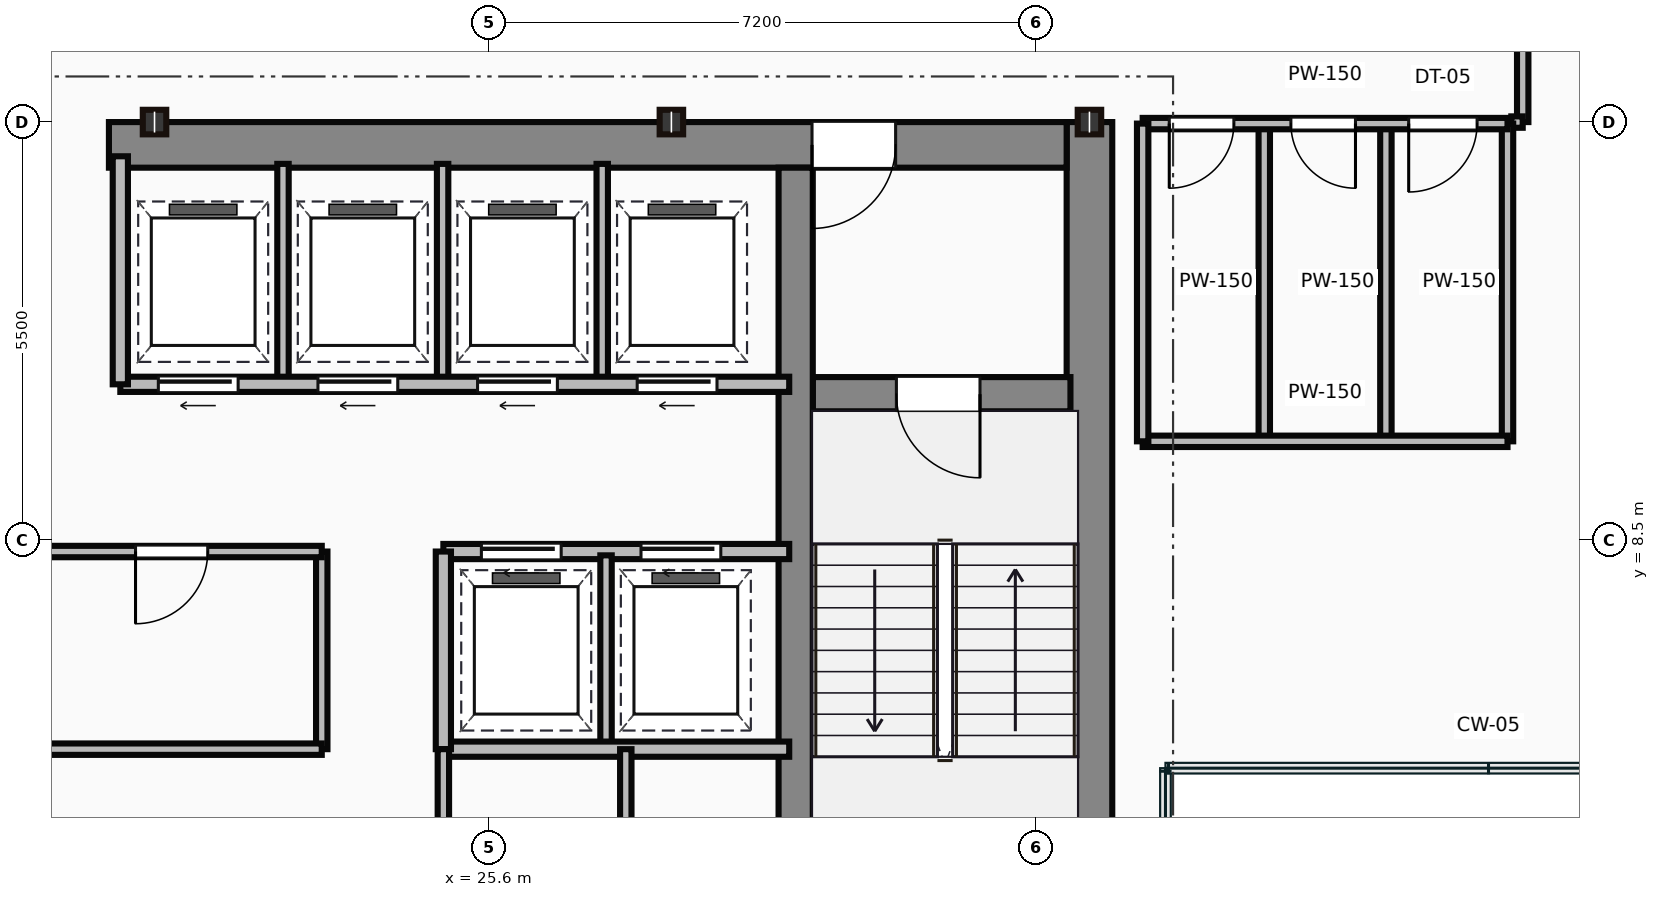
"""IFC4 building model, lengths in metres.
Left out: names, types, materials, properties, quantities, classifications, styles, units other than length and angle.
Written with IfcOpenShell. Run it as: python <this file> out.ifc"""

import sys

from ifc_helpers import new_model, si_unit, direction, frame, frame_2d, origin, origin_2d, place, context, subcontext, project, spatial, rectangle, i_section, extrude, source, transform, mapped, element, fill, save


model = new_model("IFC4")
c1 = context("Model", 3, precision=1e-05, world=origin(), true_north=direction((0.0, 1.0)))
c2 = subcontext(c1, "Body", "Model", "MODEL_VIEW")
j1 = project(units=[si_unit("LENGTHUNIT", "METRE"), si_unit("PLANEANGLEUNIT", "RADIAN")], contexts=[c1])
p1 = place(None, origin())
s1 = spatial("IfcSite", under=j1, at=p1, CompositionType="ELEMENT")
p2 = place(p1, origin())
s2 = spatial("IfcBuilding", under=s1, at=p2, CompositionType="ELEMENT")
p3 = place(p2, frame((0.0, 0.0, 192.25)))
s3 = spatial("IfcBuildingStorey", under=s2, at=p3, CompositionType="ELEMENT", Elevation=192.25)
m1 = source(origin(), c2, "Body", "SweptSolid", [
    extrude(rectangle(XDim=13.1, YDim=0.6, at=frame_2d((6.55, 0.0))), origin(), (0.0, 0.0, 1.0), 3.65),
])
p4 = place(p3, frame((33.5, 0.9, 0.0), z_axis=(0.0, 0.0, 1.0), x_axis=(0.0, 1.0, 0.0)))
e1 = element("IfcWall", 1, at=p4, inside=s3, PredefinedType="SHEAR", context=c2, shape_type="MappedRepresentation", body=[
    mapped(m1, transform((0.0, 0.0, 0.0))),
])
m2 = source(origin(), c2, "Body", "SweptSolid", [
    extrude(rectangle(XDim=12.6, YDim=0.6, at=frame_2d((6.3, 0.0))), origin(), (0.0, 0.0, 1.0), 3.65),
])
p5 = place(p3, frame((20.6, 13.7, 0.0), z_axis=(0.0, 0.0, 1.0), x_axis=(1.0, 0.0, 0.0)))
e2 = element("IfcWall", 2, at=p5, inside=s3, PredefinedType="SHEAR", context=c2, shape_type="MappedRepresentation", body=[
    mapped(m2, transform((0.0, 0.0, 0.0))),
])
p6 = place(p5, frame((9.25, 0.0, 0.0)))
e3 = element("IfcOpeningElement", 3, at=p6, cuts=e2, PredefinedType="OPENING", context=c2, shape_type="SweptSolid", body=[
    extrude(rectangle(XDim=1.1, YDim=2.15, at=frame_2d((0.55, 1.075))), frame((0.0, 0.31, 0.0), z_axis=(0.0, -1.0, 0.0), x_axis=(1.0, 0.0, 0.0)), (0.0, 0.0, 1.0), 0.62),
])
m3 = source(origin(), c2, "Body", "SweptSolid", [
    extrude(rectangle(XDim=12.5, YDim=0.45, at=frame_2d((6.25, 0.0))), origin(), (0.0, 0.0, 1.0), 3.65),
])
p7 = place(p3, frame((29.635, 0.9, 0.0), z_axis=(0.0, 0.0, 1.0), x_axis=(0.0, 1.0, 0.0)))
e4 = element("IfcWall", 4, at=p7, inside=s3, PredefinedType="SHEAR", context=c2, shape_type="MappedRepresentation", body=[
    mapped(m3, transform((0.0, 0.0, 0.0))),
])
m4 = source(origin(), c2, "Body", "SweptSolid", [
    extrude(rectangle(XDim=3.39, YDim=0.45, at=frame_2d((1.695, 0.0))), origin(), (0.0, 0.0, 1.0), 3.65),
])
p8 = place(p3, frame((29.86, 10.42, 0.0), z_axis=(0.0, 0.0, 1.0), x_axis=(1.0, 0.0, 0.0)))
e5 = element("IfcWall", 5, at=p8, inside=s3, PredefinedType="SHEAR", context=c2, shape_type="MappedRepresentation", body=[
    mapped(m4, transform((0.0, 0.0, 0.0))),
])
p9 = place(p8, frame((1.1, 0.0, 0.0)))
e6 = element("IfcOpeningElement", 6, at=p9, cuts=e5, PredefinedType="OPENING", context=c2, shape_type="SweptSolid", body=[
    extrude(rectangle(XDim=1.1, YDim=2.15, at=frame_2d((0.55, 1.075))), frame((0.0, 0.235, 0.0), z_axis=(0.0, -1.0, 0.0), x_axis=(1.0, 0.0, 0.0)), (0.0, 0.0, 1.0), 0.47),
])
m5 = source(origin(), c2, "Body", "SweptSolid", [
    extrude(i_section(OverallWidth=0.309, OverallDepth=0.323, WebThickness=0.014, FlangeThickness=0.023, at=origin_2d()), origin(), (0.0, 0.0, 1.0), 3.65),
])
for number, where, z_axis, x_axis in (
    (7, (21.2, 14.0, 0.0), (0.0, 0.0, 1.0), (1.0, 0.0, 0.0)),
    (8, (28.0, 14.0, 0.0), (0.0, 0.0, 1.0), (1.0, 0.0, 0.0)),
    (9, (33.5, 14.0, 0.0), (0.0, 0.0, 1.0), (1.0, 0.0, 0.0)),
):
    element("IfcColumn", number, at=place(p3, frame(where, z_axis=z_axis, x_axis=x_axis)), inside=s3, PredefinedType="COLUMN", context=c2, shape_type="MappedRepresentation", body=[
        mapped(m5, transform((0.0, 0.0, 0.0))),
    ])
m6 = source(origin(), c2, "Body", "SweptSolid", [
    extrude(rectangle(XDim=11.85, YDim=0.15, at=frame_2d((5.925, 0.0))), origin(), (0.0, 0.0, 1.0), 3.4),
])
p10 = place(p3, frame((11.55, 5.75, 0.0), z_axis=(0.0, 0.0, 1.0), x_axis=(1.0, 0.0, 0.0)))
e10 = element("IfcWall", 10, at=p10, inside=s3, PredefinedType="PARTITIONING", context=c2, shape_type="MappedRepresentation", body=[
    mapped(m6, transform((0.0, 0.0, 0.0))),
])
p11 = place(p3, frame((11.55, 8.35, 0.0), z_axis=(0.0, 0.0, 1.0), x_axis=(1.0, 0.0, 0.0)))
e11 = element("IfcWall", 11, at=p11, inside=s3, PredefinedType="PARTITIONING", context=c2, shape_type="MappedRepresentation", body=[
    mapped(m6, transform((0.0, 0.0, 0.0))),
])
p12 = place(p11, frame((1.1, 0.0, 0.0)))
e12 = element("IfcOpeningElement", 12, at=p12, cuts=e11, PredefinedType="OPENING", context=c2, shape_type="SweptSolid", body=[
    extrude(rectangle(XDim=0.95, YDim=2.15, at=frame_2d((0.475, 1.075))), frame((0.0, 0.085, 0.0), z_axis=(0.0, -1.0, 0.0), x_axis=(1.0, 0.0, 0.0)), (0.0, 0.0, 1.0), 0.17),
])
p13 = place(p11, frame((9.4, 0.0, 0.0)))
e13 = element("IfcOpeningElement", 13, at=p13, cuts=e11, PredefinedType="OPENING", context=c2, shape_type="SweptSolid", body=[
    extrude(rectangle(XDim=0.95, YDim=2.15, at=frame_2d((0.475, 1.075))), frame((0.0, 0.085, 0.0), z_axis=(0.0, -1.0, 0.0), x_axis=(1.0, 0.0, 0.0)), (0.0, 0.0, 1.0), 0.17),
])
m7 = source(origin(), c2, "Body", "SweptSolid", [
    extrude(rectangle(XDim=2.6, YDim=0.15, at=frame_2d((1.3, 0.0))), origin(), (0.0, 0.0, 1.0), 3.4),
])
p14 = place(p3, frame((23.4, 5.75, 0.0), z_axis=(0.0, 0.0, 1.0), x_axis=(0.0, 1.0, 0.0)))
e14 = element("IfcWall", 14, at=p14, inside=s3, PredefinedType="PARTITIONING", context=c2, shape_type="MappedRepresentation", body=[
    mapped(m7, transform((0.0, 0.0, 0.0))),
])
m8 = source(origin(), c2, "Body", "SweptSolid", [
    extrude(rectangle(XDim=8.8, YDim=0.2, at=frame_2d((4.4, 0.0))), origin(), (0.0, 0.0, 1.0), 3.4),
])
p15 = place(p3, frame((20.75, 10.55, 0.0), z_axis=(0.0, 0.0, 1.0), x_axis=(1.0, 0.0, 0.0)))
e15 = element("IfcWall", 15, at=p15, inside=s3, PredefinedType="PARTITIONING", context=c2, shape_type="MappedRepresentation", body=[
    mapped(m8, transform((0.0, 0.0, 0.0))),
])
p16 = place(p15, frame((0.5, 0.0, 0.0)))
e16 = element("IfcOpeningElement", 16, at=p16, cuts=e15, PredefinedType="OPENING", context=c2, shape_type="SweptSolid", body=[
    extrude(rectangle(XDim=1.05, YDim=2.15, at=frame_2d((0.525, 1.075))), frame((0.0, 0.11, 0.0), z_axis=(0.0, -1.0, 0.0), x_axis=(1.0, 0.0, 0.0)), (0.0, 0.0, 1.0), 0.22),
])
p17 = place(p15, frame((2.6, 0.0, 0.0)))
e17 = element("IfcOpeningElement", 17, at=p17, cuts=e15, PredefinedType="OPENING", context=c2, shape_type="SweptSolid", body=[
    extrude(rectangle(XDim=1.05, YDim=2.15, at=frame_2d((0.525, 1.075))), frame((0.0, 0.11, 0.0), z_axis=(0.0, -1.0, 0.0), x_axis=(1.0, 0.0, 0.0)), (0.0, 0.0, 1.0), 0.22),
])
p18 = place(p15, frame((4.7, 0.0, 0.0)))
e18 = element("IfcOpeningElement", 18, at=p18, cuts=e15, PredefinedType="OPENING", context=c2, shape_type="SweptSolid", body=[
    extrude(rectangle(XDim=1.05, YDim=2.15, at=frame_2d((0.525, 1.075))), frame((0.0, 0.11, 0.0), z_axis=(0.0, -1.0, 0.0), x_axis=(1.0, 0.0, 0.0)), (0.0, 0.0, 1.0), 0.22),
])
p19 = place(p15, frame((6.8, 0.0, 0.0)))
e19 = element("IfcOpeningElement", 19, at=p19, cuts=e15, PredefinedType="OPENING", context=c2, shape_type="SweptSolid", body=[
    extrude(rectangle(XDim=1.05, YDim=2.15, at=frame_2d((0.525, 1.075))), frame((0.0, 0.11, 0.0), z_axis=(0.0, -1.0, 0.0), x_axis=(1.0, 0.0, 0.0)), (0.0, 0.0, 1.0), 0.22),
])
m9 = source(origin(), c2, "Body", "SweptSolid", [
    extrude(rectangle(XDim=3.0, YDim=0.2, at=frame_2d((1.5, 0.0))), origin(), (0.0, 0.0, 1.0), 3.4),
])
p20 = place(p3, frame((20.75, 10.55, 0.0), z_axis=(0.0, 0.0, 1.0), x_axis=(0.0, 1.0, 0.0)))
e20 = element("IfcWall", 20, at=p20, inside=s3, PredefinedType="PARTITIONING", context=c2, shape_type="MappedRepresentation", body=[
    mapped(m9, transform((0.0, 0.0, 0.0))),
])
m10 = source(origin(), c2, "Body", "SweptSolid", [
    extrude(rectangle(XDim=2.85, YDim=0.15, at=frame_2d((1.425, 0.0))), origin(), (0.0, 0.0, 1.0), 3.4),
])
for number, where, z_axis, x_axis in (
    (21, (22.89, 10.6, 0.0), (0.0, 0.0, 1.0), (0.0, 1.0, 0.0)),
    (22, (24.99, 10.6, 0.0), (0.0, 0.0, 1.0), (0.0, 1.0, 0.0)),
    (23, (27.09, 10.6, 0.0), (0.0, 0.0, 1.0), (0.0, 1.0, 0.0)),
):
    element("IfcWall", number, at=place(p3, frame(where, z_axis=z_axis, x_axis=x_axis)), inside=s3, PredefinedType="PARTITIONING", context=c2, shape_type="MappedRepresentation", body=[
        mapped(m10, transform((0.0, 0.0, 0.0))),
    ])
m11 = source(origin(), c2, "Body", "SweptSolid", [
    extrude(rectangle(XDim=4.55, YDim=0.2, at=frame_2d((2.275, 0.0))), origin(), (0.0, 0.0, 1.0), 3.4),
])
p21 = place(p3, frame((25.0, 8.35, 0.0), z_axis=(0.0, 0.0, 1.0), x_axis=(1.0, 0.0, 0.0)))
e24 = element("IfcWall", 24, at=p21, inside=s3, PredefinedType="PARTITIONING", context=c2, shape_type="MappedRepresentation", body=[
    mapped(m11, transform((0.0, 0.0, 0.0))),
])
p22 = place(p21, frame((0.5, 0.0, 0.0)))
e25 = element("IfcOpeningElement", 25, at=p22, cuts=e24, PredefinedType="OPENING", context=c2, shape_type="SweptSolid", body=[
    extrude(rectangle(XDim=1.05, YDim=2.15, at=frame_2d((0.525, 1.075))), frame((0.0, 0.11, 0.0), z_axis=(0.0, -1.0, 0.0), x_axis=(1.0, 0.0, 0.0)), (0.0, 0.0, 1.0), 0.22),
])
p23 = place(p21, frame((2.6, 0.0, 0.0)))
e26 = element("IfcOpeningElement", 26, at=p23, cuts=e24, PredefinedType="OPENING", context=c2, shape_type="SweptSolid", body=[
    extrude(rectangle(XDim=1.05, YDim=2.15, at=frame_2d((0.525, 1.075))), frame((0.0, 0.11, 0.0), z_axis=(0.0, -1.0, 0.0), x_axis=(1.0, 0.0, 0.0)), (0.0, 0.0, 1.0), 0.22),
])
p24 = place(p3, frame((25.0, 5.75, 0.0), z_axis=(0.0, 0.0, 1.0), x_axis=(1.0, 0.0, 0.0)))
e27 = element("IfcWall", 27, at=p24, inside=s3, PredefinedType="PARTITIONING", context=c2, shape_type="MappedRepresentation", body=[
    mapped(m11, transform((0.0, 0.0, 0.0))),
])
m12 = source(origin(), c2, "Body", "SweptSolid", [
    extrude(rectangle(XDim=2.6, YDim=0.2, at=frame_2d((1.3, 0.0))), origin(), (0.0, 0.0, 1.0), 3.4),
])
p25 = place(p3, frame((25.0, 5.75, 0.0), z_axis=(0.0, 0.0, 1.0), x_axis=(0.0, 1.0, 0.0)))
e28 = element("IfcWall", 28, at=p25, inside=s3, PredefinedType="PARTITIONING", context=c2, shape_type="MappedRepresentation", body=[
    mapped(m12, transform((0.0, 0.0, 0.0))),
])
m13 = source(origin(), c2, "Body", "SweptSolid", [
    extrude(rectangle(XDim=2.5, YDim=0.15, at=frame_2d((1.25, 0.0))), origin(), (0.0, 0.0, 1.0), 3.4),
])
p26 = place(p3, frame((27.14, 5.8, 0.0), z_axis=(0.0, 0.0, 1.0), x_axis=(0.0, 1.0, 0.0)))
e29 = element("IfcWall", 29, at=p26, inside=s3, PredefinedType="PARTITIONING", context=c2, shape_type="MappedRepresentation", body=[
    mapped(m13, transform((0.0, 0.0, 0.0))),
])
m14 = source(origin(), c2, "Body", "SweptSolid", [
    extrude(rectangle(XDim=4.9, YDim=0.15, at=frame_2d((2.45, 0.0))), origin(), (0.0, 0.0, 1.0), 3.4),
])
p27 = place(p3, frame((25.0, 0.85, 0.0), z_axis=(0.0, 0.0, 1.0), x_axis=(0.0, 1.0, 0.0)))
e30 = element("IfcWall", 30, at=p27, inside=s3, PredefinedType="PARTITIONING", context=c2, shape_type="MappedRepresentation", body=[
    mapped(m14, transform((0.0, 0.0, 0.0))),
])
p28 = place(p27, frame((2.5, 0.0, 0.0)))
e31 = element("IfcOpeningElement", 31, at=p28, cuts=e30, PredefinedType="OPENING", context=c2, shape_type="SweptSolid", body=[
    extrude(rectangle(XDim=0.95, YDim=2.15, at=frame_2d((0.475, 1.075))), frame((0.0, 0.085, 0.0), z_axis=(0.0, -1.0, 0.0), x_axis=(1.0, 0.0, 0.0)), (0.0, 0.0, 1.0), 0.17),
])
m15 = source(origin(), c2, "Body", "SweptSolid", [
    extrude(rectangle(XDim=3.4, YDim=0.15, at=frame_2d((1.7, 0.0))), origin(), (0.0, 0.0, 1.0), 3.4),
])
p29 = place(p3, frame((27.4, 2.35, 0.0), z_axis=(0.0, 0.0, 1.0), x_axis=(0.0, 1.0, 0.0)))
e32 = element("IfcWall", 32, at=p29, inside=s3, PredefinedType="PARTITIONING", context=c2, shape_type="MappedRepresentation", body=[
    mapped(m15, transform((0.0, 0.0, 0.0))),
])
p30 = place(p29, frame((1.1, 0.0, 0.0)))
e33 = element("IfcOpeningElement", 33, at=p30, cuts=e32, PredefinedType="OPENING", context=c2, shape_type="SweptSolid", body=[
    extrude(rectangle(XDim=0.85, YDim=2.1, at=frame_2d((0.425, 1.05))), frame((0.0, 0.085, 0.0), z_axis=(0.0, -1.0, 0.0), x_axis=(1.0, 0.0, 0.0)), (0.0, 0.0, 1.0), 0.17),
])
m16 = source(origin(), c2, "Body", "SweptSolid", [
    extrude(rectangle(XDim=4.8, YDim=0.15, at=frame_2d((2.4, 0.0))), origin(), (0.0, 0.0, 1.0), 2.787),
])
p31 = place(p3, frame((34.2, 13.98, 0.0), z_axis=(0.0, 0.0, 1.0), x_axis=(1.0, 0.0, 0.0)))
e34 = element("IfcWall", 34, at=p31, inside=s3, PredefinedType="PARTITIONING", context=c2, shape_type="MappedRepresentation", body=[
    mapped(m16, transform((0.0, 0.0, 0.0))),
])
p32 = place(p31, frame((0.35, 0.0, 0.0)))
e35 = element("IfcOpeningElement", 35, at=p32, cuts=e34, PredefinedType="OPENING", context=c2, shape_type="SweptSolid", body=[
    extrude(rectangle(XDim=0.85, YDim=2.1, at=frame_2d((0.425, 1.05))), frame((0.0, 0.085, 0.0), z_axis=(0.0, -1.0, 0.0), x_axis=(1.0, 0.0, 0.0)), (0.0, 0.0, 1.0), 0.17),
])
p33 = place(p31, frame((1.95, 0.0, 0.0)))
e36 = element("IfcOpeningElement", 36, at=p33, cuts=e34, PredefinedType="OPENING", context=c2, shape_type="SweptSolid", body=[
    extrude(rectangle(XDim=0.85, YDim=2.1, at=frame_2d((0.425, 1.05))), frame((0.0, 0.085, 0.0), z_axis=(0.0, -1.0, 0.0), x_axis=(1.0, 0.0, 0.0)), (0.0, 0.0, 1.0), 0.17),
])
p34 = place(p31, frame((3.5, 0.0, 0.0)))
e37 = element("IfcOpeningElement", 37, at=p34, cuts=e34, PredefinedType="OPENING", context=c2, shape_type="SweptSolid", body=[
    extrude(rectangle(XDim=0.9, YDim=2.1, at=frame_2d((0.45, 1.05))), frame((0.0, 0.085, 0.0), z_axis=(0.0, -1.0, 0.0), x_axis=(1.0, 0.0, 0.0)), (0.0, 0.0, 1.0), 0.17),
])
m17 = source(origin(), c2, "Body", "SweptSolid", [
    extrude(rectangle(XDim=4.8, YDim=0.15, at=frame_2d((2.4, 0.0))), origin(), (0.0, 0.0, 1.0), 3.4),
])
p35 = place(p3, frame((34.2, 9.8, 0.0), z_axis=(0.0, 0.0, 1.0), x_axis=(1.0, 0.0, 0.0)))
e38 = element("IfcWall", 38, at=p35, inside=s3, PredefinedType="PARTITIONING", context=c2, shape_type="MappedRepresentation", body=[
    mapped(m17, transform((0.0, 0.0, 0.0))),
])
m18 = source(origin(), c2, "Body", "SweptSolid", [
    extrude(rectangle(XDim=4.18, YDim=0.15, at=frame_2d((2.09, 0.0))), origin(), (0.0, 0.0, 1.0), 3.4),
])
for number, where, z_axis, x_axis in (
    (39, (39.0, 9.8, 0.0), (0.0, 0.0, 1.0), (0.0, 1.0, 0.0)),
    (40, (34.2, 9.8, 0.0), (0.0, 0.0, 1.0), (0.0, 1.0, 0.0)),
    (41, (35.8, 9.8, 0.0), (0.0, 0.0, 1.0), (0.0, 1.0, 0.0)),
    (42, (37.4, 9.8, 0.0), (0.0, 0.0, 1.0), (0.0, 1.0, 0.0)),
):
    element("IfcWall", number, at=place(p3, frame(where, z_axis=z_axis, x_axis=x_axis)), inside=s3, PredefinedType="PARTITIONING", context=c2, shape_type="MappedRepresentation", body=[
        mapped(m18, transform((0.0, 0.0, 0.0))),
    ])
m19 = source(origin(), c2, "Body", "SweptSolid", [
    extrude(rectangle(XDim=2.2, YDim=0.15, at=frame_2d((1.1, 0.0))), origin(), (0.0, 0.0, 1.0), 3.4),
])
p36 = place(p3, frame((39.2, 16.2, 0.0), z_axis=(0.0, 0.0, 1.0), x_axis=(0.0, -1.0, 0.0)))
e43 = element("IfcWall", 43, at=p36, inside=s3, PredefinedType="PARTITIONING", context=c2, shape_type="MappedRepresentation", body=[
    mapped(m19, transform((0.0, 0.0, 0.0))),
])
m20 = source(origin(), c2, "Body", "SweptSolid", [
    extrude(rectangle(XDim=0.15, YDim=0.15, at=frame_2d((0.075, 0.0))), origin(), (0.0, 0.0, 1.0), 3.4),
])
p37 = place(p3, frame((39.2, 14.0, 0.0), z_axis=(0.0, 0.0, 1.0), x_axis=(-1.0, 0.0, 0.0)))
e44 = element("IfcWall", 44, at=p37, inside=s3, PredefinedType="PARTITIONING", context=c2, shape_type="MappedRepresentation", body=[
    mapped(m20, transform((0.0, 0.0, 0.0))),
])
m21 = source(origin(), c2, "Body", "SweptSolid", [
    extrude(rectangle(XDim=1.1, YDim=2.15, at=frame_2d((0.55, 1.075))), frame((0.0, 0.025, 0.0), z_axis=(0.0, -1.0, 0.0), x_axis=(1.0, 0.0, 0.0)), (0.0, 0.0, 1.0), 0.05),
])
p38 = place(p9, frame((1.1, 0.0, 0.0), z_axis=(0.0, 0.0, 1.0), x_axis=(-1.0, 0.0, 0.0)))
e45 = element("IfcDoor", 45, at=p38, inside=s3, OperationType="SINGLE_SWING_RIGHT", PredefinedType="DOOR", context=c2, shape_type="MappedRepresentation", body=[
    mapped(m21, transform((0.0, 0.0, 0.0))),
])
fill(e6, e45)
p39 = place(p6, origin())
e46 = element("IfcDoor", 46, at=p39, inside=s3, OperationType="SINGLE_SWING_LEFT", PredefinedType="DOOR", context=c2, shape_type="MappedRepresentation", body=[
    mapped(m21, transform((0.0, 0.0, 0.0))),
])
fill(e3, e46)
m22 = source(origin(), c2, "Body", "SweptSolid", [
    extrude(rectangle(XDim=0.95, YDim=2.15, at=frame_2d((0.475, 1.075))), frame((0.0, 0.025, 0.0), z_axis=(0.0, -1.0, 0.0), x_axis=(1.0, 0.0, 0.0)), (0.0, 0.0, 1.0), 0.05),
])
p40 = place(p13, origin())
e47 = element("IfcDoor", 47, at=p40, inside=s3, OperationType="SINGLE_SWING_LEFT", PredefinedType="DOOR", context=c2, shape_type="MappedRepresentation", body=[
    mapped(m22, transform((0.0, 0.0, 0.0))),
])
fill(e13, e47)
m23 = source(origin(), c2, "Body", "SweptSolid", [
    extrude(rectangle(XDim=1.05, YDim=2.15, at=frame_2d((0.525, 1.075))), frame((0.0, 0.025, 0.0), z_axis=(0.0, -1.0, 0.0), x_axis=(1.0, 0.0, 0.0)), (0.0, 0.0, 1.0), 0.05),
])
p41 = place(p16, frame((1.05, 0.0, 0.0), z_axis=(0.0, 0.0, 1.0), x_axis=(-1.0, 0.0, 0.0)))
e48 = element("IfcDoor", 48, at=p41, inside=s3, OperationType="SLIDING_TO_LEFT", PredefinedType="DOOR", context=c2, shape_type="MappedRepresentation", body=[
    mapped(m23, transform((0.0, 0.0, 0.0))),
])
fill(e16, e48)
p42 = place(p17, frame((1.05, 0.0, 0.0), z_axis=(0.0, 0.0, 1.0), x_axis=(-1.0, 0.0, 0.0)))
e49 = element("IfcDoor", 49, at=p42, inside=s3, OperationType="SLIDING_TO_LEFT", PredefinedType="DOOR", context=c2, shape_type="MappedRepresentation", body=[
    mapped(m23, transform((0.0, 0.0, 0.0))),
])
fill(e17, e49)
p43 = place(p18, frame((1.05, 0.0, 0.0), z_axis=(0.0, 0.0, 1.0), x_axis=(-1.0, 0.0, 0.0)))
e50 = element("IfcDoor", 50, at=p43, inside=s3, OperationType="SLIDING_TO_LEFT", PredefinedType="DOOR", context=c2, shape_type="MappedRepresentation", body=[
    mapped(m23, transform((0.0, 0.0, 0.0))),
])
fill(e18, e50)
p44 = place(p19, frame((1.05, 0.0, 0.0), z_axis=(0.0, 0.0, 1.0), x_axis=(-1.0, 0.0, 0.0)))
e51 = element("IfcDoor", 51, at=p44, inside=s3, OperationType="SLIDING_TO_LEFT", PredefinedType="DOOR", context=c2, shape_type="MappedRepresentation", body=[
    mapped(m23, transform((0.0, 0.0, 0.0))),
])
fill(e19, e51)
p45 = place(p22, origin())
e52 = element("IfcDoor", 52, at=p45, inside=s3, OperationType="SLIDING_TO_LEFT", PredefinedType="DOOR", context=c2, shape_type="MappedRepresentation", body=[
    mapped(m23, transform((0.0, 0.0, 0.0))),
])
fill(e25, e52)
p46 = place(p23, origin())
e53 = element("IfcDoor", 53, at=p46, inside=s3, OperationType="SLIDING_TO_LEFT", PredefinedType="DOOR", context=c2, shape_type="MappedRepresentation", body=[
    mapped(m23, transform((0.0, 0.0, 0.0))),
])
fill(e26, e53)
m24 = source(origin(), c2, "Body", "SweptSolid", [
    extrude(rectangle(XDim=0.85, YDim=2.1, at=frame_2d((0.425, 1.05))), frame((0.0, 0.025, 0.0), z_axis=(0.0, -1.0, 0.0), x_axis=(1.0, 0.0, 0.0)), (0.0, 0.0, 1.0), 0.05),
])
p47 = place(p32, frame((0.85, 0.0, 0.0), z_axis=(0.0, 0.0, 1.0), x_axis=(-1.0, 0.0, 0.0)))
e54 = element("IfcDoor", 54, at=p47, inside=s3, OperationType="SINGLE_SWING_LEFT", PredefinedType="DOOR", context=c2, shape_type="MappedRepresentation", body=[
    mapped(m24, transform((0.0, 0.0, 0.0))),
])
fill(e35, e54)
p48 = place(p33, frame((0.85, 0.0, 0.0), z_axis=(0.0, 0.0, 1.0), x_axis=(-1.0, 0.0, 0.0)))
e55 = element("IfcDoor", 55, at=p48, inside=s3, OperationType="SINGLE_SWING_RIGHT", PredefinedType="DOOR", context=c2, shape_type="MappedRepresentation", body=[
    mapped(m24, transform((0.0, 0.0, 0.0))),
])
fill(e36, e55)
m25 = source(origin(), c2, "Body", "SweptSolid", [
    extrude(rectangle(XDim=0.9, YDim=2.1, at=frame_2d((0.45, 1.05))), frame((0.0, 0.025, 0.0), z_axis=(0.0, -1.0, 0.0), x_axis=(1.0, 0.0, 0.0)), (0.0, 0.0, 1.0), 0.05),
])
p49 = place(p34, frame((0.9, 0.0, 0.0), z_axis=(0.0, 0.0, 1.0), x_axis=(-1.0, 0.0, 0.0)))
e56 = element("IfcDoor", 56, at=p49, inside=s3, OperationType="SINGLE_SWING_LEFT", PredefinedType="DOOR", context=c2, shape_type="MappedRepresentation", body=[
    mapped(m25, transform((0.0, 0.0, 0.0))),
])
fill(e37, e56)
save(model, sys.argv[1])
